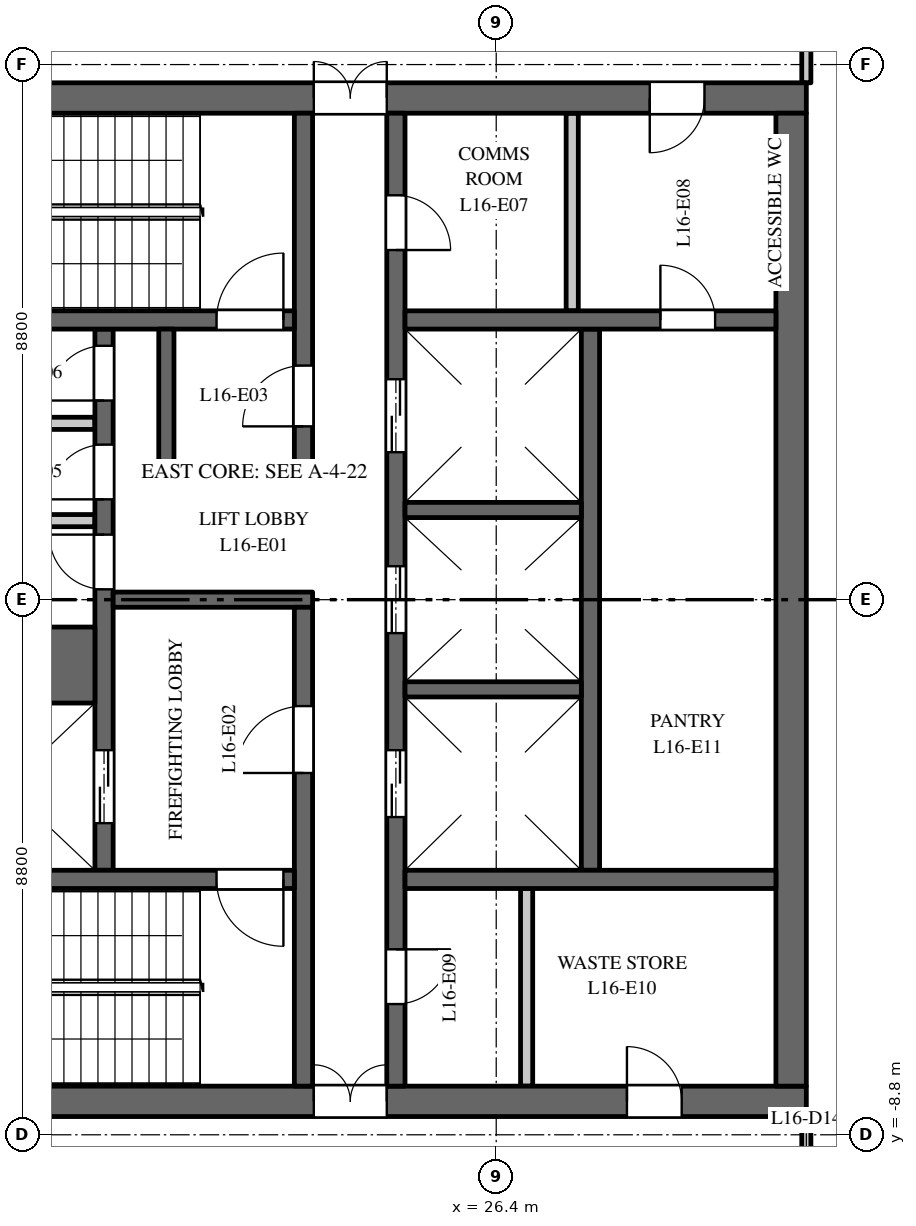
"""IFC4 building model, lengths in metres.
Left out: names, types, materials, properties, quantities, classifications, styles, units other than length and angle.
Written with IfcOpenShell. Run it as: python <this file> out.ifc"""

import sys

from ifc_helpers import new_model, si_unit, direction, frame, frame_2d, origin, place, context, subcontext, project, spatial, rectangle, extrude, element, fill, save


model = new_model("IFC4")
c1 = context("Model", 3, precision=1e-05, world=origin(), true_north=direction((0.0, 1.0)))
c2 = subcontext(c1, "Body", "Model", "MODEL_VIEW")
j1 = project(units=[si_unit("LENGTHUNIT", "METRE"), si_unit("PLANEANGLEUNIT", "RADIAN")], contexts=[c1])
p1 = place(None, origin())
s1 = spatial("IfcSite", under=j1, at=p1, CompositionType="ELEMENT")
p2 = place(p1, origin())
s2 = spatial("IfcBuilding", under=s1, at=p2, CompositionType="ELEMENT")
p3 = place(p2, frame((0.0, 0.0, 74.5)))
s3 = spatial("IfcBuildingStorey", under=s2, at=p3, CompositionType="ELEMENT", Elevation=74.5)
p4 = place(p3, frame((16.5, 8.25, 0.0), z_axis=(0.0, 0.0, 1.0), x_axis=(1.0, 0.0, 0.0)))
e1 = element("IfcWall", 1, at=p4, inside=s3, PredefinedType="SHEAR", context=c2, shape_type="SweptSolid", body=[
    extrude(rectangle(XDim=15.0, YDim=0.5, at=frame_2d((7.5, 0.0))), origin(), (0.0, 0.0, 1.0), 3.7),
])
p5 = place(p4, frame((6.9, 0.0, 0.0)))
e2 = element("IfcOpeningElement", 2, at=p5, cuts=e1, PredefinedType="OPENING", context=c2, shape_type="SweptSolid", body=[
    extrude(rectangle(XDim=1.2, YDim=2.1, at=frame_2d((0.6, 1.05))), frame((0.0, 0.26, 0.0), z_axis=(0.0, -1.0, 0.0), x_axis=(1.0, 0.0, 0.0)), (0.0, 0.0, 1.0), 0.52),
])
p6 = place(p4, frame((12.425, 0.0, 0.0)))
e3 = element("IfcOpeningElement", 3, at=p6, cuts=e1, PredefinedType="OPENING", context=c2, shape_type="SweptSolid", body=[
    extrude(rectangle(XDim=0.9, YDim=2.1, at=frame_2d((0.45, 1.05))), frame((0.0, 0.26, 0.0), z_axis=(0.0, -1.0, 0.0), x_axis=(1.0, 0.0, 0.0)), (0.0, 0.0, 1.0), 0.52),
])
p7 = place(p3, frame((16.5, -8.25, 0.0), z_axis=(0.0, 0.0, 1.0), x_axis=(1.0, 0.0, 0.0)))
e4 = element("IfcWall", 4, at=p7, inside=s3, PredefinedType="SHEAR", context=c2, shape_type="SweptSolid", body=[
    extrude(rectangle(XDim=15.0, YDim=0.5, at=frame_2d((7.5, 0.0))), origin(), (0.0, 0.0, 1.0), 3.7),
])
p8 = place(p7, frame((6.9, 0.0, 0.0)))
e5 = element("IfcOpeningElement", 5, at=p8, cuts=e4, PredefinedType="OPENING", context=c2, shape_type="SweptSolid", body=[
    extrude(rectangle(XDim=1.2, YDim=2.1, at=frame_2d((0.6, 1.05))), frame((0.0, 0.26, 0.0), z_axis=(0.0, -1.0, 0.0), x_axis=(1.0, 0.0, 0.0)), (0.0, 0.0, 1.0), 0.52),
])
p9 = place(p7, frame((12.05, 0.0, 0.0)))
e6 = element("IfcOpeningElement", 6, at=p9, cuts=e4, PredefinedType="OPENING", context=c2, shape_type="SweptSolid", body=[
    extrude(rectangle(XDim=0.9, YDim=2.1, at=frame_2d((0.45, 1.05))), frame((0.0, 0.26, 0.0), z_axis=(0.0, -1.0, 0.0), x_axis=(1.0, 0.0, 0.0)), (0.0, 0.0, 1.0), 0.52),
])
for number, where, z_axis, x_axis in (
    (7, (16.9, 1.3, 0.0), (0.0, 0.0, 1.0), (1.0, 0.0, 0.0)),
    (8, (16.9, 2.9, 0.0), (0.0, 0.0, 1.0), (1.0, 0.0, 0.0)),
):
    element("IfcWall", number, at=place(p3, frame(where, z_axis=z_axis, x_axis=x_axis)), inside=s3, PredefinedType="PARTITIONING", context=c2, shape_type="SweptSolid", body=[
        extrude(rectangle(XDim=2.9, YDim=0.2, at=frame_2d((1.45, 0.0))), origin(), (0.0, 0.0, 1.0), 3.7),
    ])
p10 = place(p3, frame((27.95, -4.45, 0.0), z_axis=(0.0, 0.0, 1.0), x_axis=(0.0, 1.0, 0.0)))
e9 = element("IfcWall", 9, at=p10, inside=s3, PredefinedType="SHEAR", context=c2, shape_type="SweptSolid", body=[
    extrude(rectangle(XDim=8.9, YDim=0.3, at=frame_2d((4.45, 0.0))), origin(), (0.0, 0.0, 1.0), 3.7),
])
p11 = place(p3, frame((19.95, -4.45, 0.0), z_axis=(0.0, 0.0, 1.0), x_axis=(0.0, 1.0, 0.0)))
e10 = element("IfcWall", 10, at=p11, inside=s3, PredefinedType="SHEAR", context=c2, shape_type="SweptSolid", body=[
    extrude(rectangle(XDim=8.9, YDim=0.3, at=frame_2d((4.45, 0.0))), origin(), (0.0, 0.0, 1.0), 3.7),
])
p12 = place(p11, frame((0.775, 0.0, 0.0)))
e11 = element("IfcOpeningElement", 11, at=p12, cuts=e10, PredefinedType="OPENING", context=c2, shape_type="SweptSolid", body=[
    extrude(rectangle(XDim=1.2, YDim=2.1, at=frame_2d((0.6, 1.05))), frame((0.0, 0.16, 0.0), z_axis=(0.0, -1.0, 0.0), x_axis=(1.0, 0.0, 0.0)), (0.0, 0.0, 1.0), 0.32),
])
p13 = place(p11, frame((4.62, 0.0, 0.0)))
e12 = element("IfcOpeningElement", 12, at=p13, cuts=e10, PredefinedType="OPENING", context=c2, shape_type="SweptSolid", body=[
    extrude(rectangle(XDim=0.9, YDim=2.1, at=frame_2d((0.45, 1.05))), frame((0.0, 0.16, 0.0), z_axis=(0.0, -1.0, 0.0), x_axis=(1.0, 0.0, 0.0)), (0.0, 0.0, 1.0), 0.32),
])
p14 = place(p11, frame((6.1, 0.0, 0.0)))
e13 = element("IfcOpeningElement", 13, at=p14, cuts=e10, PredefinedType="OPENING", context=c2, shape_type="SweptSolid", body=[
    extrude(rectangle(XDim=0.9, YDim=2.1, at=frame_2d((0.45, 1.05))), frame((0.0, 0.16, 0.0), z_axis=(0.0, -1.0, 0.0), x_axis=(1.0, 0.0, 0.0)), (0.0, 0.0, 1.0), 0.32),
])
p15 = place(p11, frame((7.725, 0.0, 0.0)))
e14 = element("IfcOpeningElement", 14, at=p15, cuts=e10, PredefinedType="OPENING", context=c2, shape_type="SweptSolid", body=[
    extrude(rectangle(XDim=0.9, YDim=2.1, at=frame_2d((0.45, 1.05))), frame((0.0, 0.16, 0.0), z_axis=(0.0, -1.0, 0.0), x_axis=(1.0, 0.0, 0.0)), (0.0, 0.0, 1.0), 0.32),
])
p16 = place(p3, frame((24.75, -8.0, 0.0), z_axis=(0.0, 0.0, 1.0), x_axis=(0.0, 1.0, 0.0)))
e15 = element("IfcWall", 15, at=p16, inside=s3, PredefinedType="SHEAR", context=c2, shape_type="SweptSolid", body=[
    extrude(rectangle(XDim=16.0, YDim=0.3, at=frame_2d((8.0, 0.0))), origin(), (0.0, 0.0, 1.0), 3.7),
])
p17 = place(p16, frame((4.425, 0.0, 0.0)))
e16 = element("IfcOpeningElement", 16, at=p17, cuts=e15, PredefinedType="OPENING", context=c2, shape_type="SweptSolid", body=[
    extrude(rectangle(XDim=1.1, YDim=2.1, at=frame_2d((0.55, 1.05))), frame((0.0, 0.16, 0.0), z_axis=(0.0, -1.0, 0.0), x_axis=(1.0, 0.0, 0.0)), (0.0, 0.0, 1.0), 0.32),
])
p18 = place(p16, frame((7.45, 0.0, 0.0)))
e17 = element("IfcOpeningElement", 17, at=p18, cuts=e15, PredefinedType="OPENING", context=c2, shape_type="SweptSolid", body=[
    extrude(rectangle(XDim=1.1, YDim=2.1, at=frame_2d((0.55, 1.05))), frame((0.0, 0.16, 0.0), z_axis=(0.0, -1.0, 0.0), x_axis=(1.0, 0.0, 0.0)), (0.0, 0.0, 1.0), 0.32),
])
p19 = place(p16, frame((10.425, 0.0, 0.0)))
e18 = element("IfcOpeningElement", 18, at=p19, cuts=e15, PredefinedType="OPENING", context=c2, shape_type="SweptSolid", body=[
    extrude(rectangle(XDim=1.2, YDim=2.1, at=frame_2d((0.6, 1.05))), frame((0.0, 0.16, 0.0), z_axis=(0.0, -1.0, 0.0), x_axis=(1.0, 0.0, 0.0)), (0.0, 0.0, 1.0), 0.32),
])
p20 = place(p16, frame((13.75, 0.0, 0.0)))
e19 = element("IfcOpeningElement", 19, at=p20, cuts=e15, PredefinedType="OPENING", context=c2, shape_type="SweptSolid", body=[
    extrude(rectangle(XDim=0.9, YDim=2.1, at=frame_2d((0.45, 1.05))), frame((0.0, 0.16, 0.0), z_axis=(0.0, -1.0, 0.0), x_axis=(1.0, 0.0, 0.0)), (0.0, 0.0, 1.0), 0.32),
])
p21 = place(p16, frame((1.35, 0.0, 0.0)))
e20 = element("IfcOpeningElement", 20, at=p21, cuts=e15, PredefinedType="OPENING", context=c2, shape_type="SweptSolid", body=[
    extrude(rectangle(XDim=0.9, YDim=2.1, at=frame_2d((0.45, 1.05))), frame((0.0, 0.16, 0.0), z_axis=(0.0, -1.0, 0.0), x_axis=(1.0, 0.0, 0.0)), (0.0, 0.0, 1.0), 0.32),
])
p22 = place(p3, frame((20.1, 0.0, 0.0), z_axis=(0.0, 0.0, 1.0), x_axis=(1.0, 0.0, 0.0)))
e21 = element("IfcWall", 21, at=p22, inside=s3, PredefinedType="SHEAR", context=c2, shape_type="SweptSolid", body=[
    extrude(rectangle(XDim=3.28, YDim=0.25, at=frame_2d((1.64, 0.0))), origin(), (0.0, 0.0, 1.0), 3.7),
])
p23 = place(p3, frame((31.25, -8.0, 0.0), z_axis=(0.0, 0.0, 1.0), x_axis=(0.0, 1.0, 0.0)))
e22 = element("IfcWall", 22, at=p23, inside=s3, PredefinedType="SHEAR", context=c2, shape_type="SweptSolid", body=[
    extrude(rectangle(XDim=16.0, YDim=0.5, at=frame_2d((8.0, 0.0))), origin(), (0.0, 0.0, 1.0), 3.7),
])
p24 = place(p3, frame((24.9, 4.6, 0.0), z_axis=(0.0, 0.0, 1.0), x_axis=(1.0, 0.0, 0.0)))
e23 = element("IfcWall", 23, at=p24, inside=s3, PredefinedType="SHEAR", context=c2, shape_type="SweptSolid", body=[
    extrude(rectangle(XDim=6.1, YDim=0.3, at=frame_2d((3.05, 0.0))), origin(), (0.0, 0.0, 1.0), 3.7),
])
p25 = place(p24, frame((4.2, 0.0, 0.0)))
e24 = element("IfcOpeningElement", 24, at=p25, cuts=e23, PredefinedType="OPENING", context=c2, shape_type="SweptSolid", body=[
    extrude(rectangle(XDim=0.9, YDim=2.1, at=frame_2d((0.45, 1.05))), frame((0.0, 0.16, 0.0), z_axis=(0.0, -1.0, 0.0), x_axis=(1.0, 0.0, 0.0)), (0.0, 0.0, 1.0), 0.32),
])
for number, where, z_axis, x_axis in (
    (25, (27.65, 4.75, 0.0), (0.0, 0.0, 1.0), (0.0, 1.0, 0.0)),
    (26, (26.9, -8.0, 0.0), (0.0, 0.0, 1.0), (0.0, 1.0, 0.0)),
):
    element("IfcWall", number, at=place(p3, frame(where, z_axis=z_axis, x_axis=x_axis)), inside=s3, PredefinedType="PARTITIONING", context=c2, shape_type="SweptSolid", body=[
        extrude(rectangle(XDim=3.25, YDim=0.2, at=frame_2d((1.625, 0.0))), origin(), (0.0, 0.0, 1.0), 3.7),
    ])
p26 = place(p3, frame((24.9, -4.6, 0.0), z_axis=(0.0, 0.0, 1.0), x_axis=(1.0, 0.0, 0.0)))
e27 = element("IfcWall", 27, at=p26, inside=s3, PredefinedType="SHEAR", context=c2, shape_type="SweptSolid", body=[
    extrude(rectangle(XDim=6.1, YDim=0.3, at=frame_2d((3.05, 0.0))), origin(), (0.0, 0.0, 1.0), 3.7),
])
p27 = place(p3, frame((16.9, -1.075, 0.0), z_axis=(0.0, 0.0, 1.0), x_axis=(1.0, 0.0, 0.0)))
e28 = element("IfcWall", 28, at=p27, inside=s3, PredefinedType="SHEAR", context=c2, shape_type="SweptSolid", body=[
    extrude(rectangle(XDim=2.9, YDim=1.25, at=frame_2d((1.45, 0.0))), origin(), (0.0, 0.0, 1.0), 3.7),
])
for number, where, z_axis, x_axis in (
    (29, (24.9, -1.475, 0.0), (0.0, 0.0, 1.0), (1.0, 0.0, 0.0)),
    (30, (24.9, 1.475, 0.0), (0.0, 0.0, 1.0), (1.0, 0.0, 0.0)),
):
    element("IfcWall", number, at=place(p3, frame(where, z_axis=z_axis, x_axis=x_axis)), inside=s3, PredefinedType="SHEAR", context=c2, shape_type="SweptSolid", body=[
        extrude(rectangle(XDim=2.9, YDim=0.25, at=frame_2d((1.45, 0.0))), origin(), (0.0, 0.0, 1.0), 3.7),
    ])
p28 = place(p3, frame((23.23, 2.25, 0.0), z_axis=(0.0, 0.0, 1.0), x_axis=(0.0, 1.0, 0.0)))
e31 = element("IfcWall", 31, at=p28, inside=s3, PredefinedType="SHEAR", context=c2, shape_type="SweptSolid", body=[
    extrude(rectangle(XDim=5.75, YDim=0.3, at=frame_2d((2.875, 0.0))), origin(), (0.0, 0.0, 1.0), 3.7),
])
p29 = place(p28, frame((0.6, 0.0, 0.0)))
e32 = element("IfcOpeningElement", 32, at=p29, cuts=e31, PredefinedType="OPENING", context=c2, shape_type="SweptSolid", body=[
    extrude(rectangle(XDim=1.0, YDim=2.1, at=frame_2d((0.5, 1.05))), frame((0.0, 0.16, 0.0), z_axis=(0.0, -1.0, 0.0), x_axis=(1.0, 0.0, 0.0)), (0.0, 0.0, 1.0), 0.32),
])
p30 = place(p3, frame((23.23, -8.0, 0.0), z_axis=(0.0, 0.0, 1.0), x_axis=(0.0, 1.0, 0.0)))
e33 = element("IfcWall", 33, at=p30, inside=s3, PredefinedType="SHEAR", context=c2, shape_type="SweptSolid", body=[
    extrude(rectangle(XDim=7.875, YDim=0.3, at=frame_2d((3.938, 0.0))), origin(), (0.0, 0.0, 1.0), 3.7),
])
p31 = place(p30, frame((5.15, 0.0, 0.0)))
e34 = element("IfcOpeningElement", 34, at=p31, cuts=e33, PredefinedType="OPENING", context=c2, shape_type="SweptSolid", body=[
    extrude(rectangle(XDim=1.1, YDim=2.1, at=frame_2d((0.55, 1.05))), frame((0.0, 0.16, 0.0), z_axis=(0.0, -1.0, 0.0), x_axis=(1.0, 0.0, 0.0)), (0.0, 0.0, 1.0), 0.32),
])
p32 = place(p3, frame((16.9, 4.6, 0.0), z_axis=(0.0, 0.0, 1.0), x_axis=(1.0, 0.0, 0.0)))
e35 = element("IfcWall", 35, at=p32, inside=s3, PredefinedType="SHEAR", context=c2, shape_type="SweptSolid", body=[
    extrude(rectangle(XDim=6.18, YDim=0.3, at=frame_2d((3.09, 0.0))), origin(), (0.0, 0.0, 1.0), 3.7),
])
p33 = place(p32, frame((4.9, 0.0, 0.0)))
e36 = element("IfcOpeningElement", 36, at=p33, cuts=e35, PredefinedType="OPENING", context=c2, shape_type="SweptSolid", body=[
    extrude(rectangle(XDim=1.1, YDim=2.1, at=frame_2d((0.55, 1.05))), frame((0.0, 0.16, 0.0), z_axis=(0.0, -1.0, 0.0), x_axis=(1.0, 0.0, 0.0)), (0.0, 0.0, 1.0), 0.32),
])
p34 = place(p3, frame((16.9, -4.6, 0.0), z_axis=(0.0, 0.0, 1.0), x_axis=(1.0, 0.0, 0.0)))
e37 = element("IfcWall", 37, at=p34, inside=s3, PredefinedType="SHEAR", context=c2, shape_type="SweptSolid", body=[
    extrude(rectangle(XDim=6.18, YDim=0.3, at=frame_2d((3.09, 0.0))), origin(), (0.0, 0.0, 1.0), 3.7),
])
p35 = place(p34, frame((4.9, 0.0, 0.0)))
e38 = element("IfcOpeningElement", 38, at=p35, cuts=e37, PredefinedType="OPENING", context=c2, shape_type="SweptSolid", body=[
    extrude(rectangle(XDim=1.1, YDim=2.1, at=frame_2d((0.55, 1.05))), frame((0.0, 0.16, 0.0), z_axis=(0.0, -1.0, 0.0), x_axis=(1.0, 0.0, 0.0)), (0.0, 0.0, 1.0), 0.32),
])
p36 = place(p3, frame((20.85, 2.125, 0.0), z_axis=(0.0, 0.0, 1.0), x_axis=(1.0, 0.0, 0.0)))
e39 = element("IfcWall", 39, at=p36, inside=s3, PredefinedType="SHEAR", context=c2, shape_type="SweptSolid", body=[
    extrude(rectangle(XDim=2.53, YDim=0.25, at=frame_2d((1.265, 0.0))), origin(), (0.0, 0.0, 1.0), 3.7),
])
p37 = place(p3, frame((20.975, 2.25, 0.0), z_axis=(0.0, 0.0, 1.0), x_axis=(0.0, 1.0, 0.0)))
e40 = element("IfcWall", 40, at=p37, inside=s3, PredefinedType="SHEAR", context=c2, shape_type="SweptSolid", body=[
    extrude(rectangle(XDim=2.2, YDim=0.25, at=frame_2d((1.1, 0.0))), origin(), (0.0, 0.0, 1.0), 3.7),
])
p38 = place(p3, frame((31.5, -10.7, 0.0), z_axis=(0.0, 0.0, 1.0), x_axis=(0.0, 1.0, 0.0)))
e41 = element("IfcWall", 41, at=p38, inside=s3, PredefinedType="PARTITIONING", context=c2, shape_type="SweptSolid", body=[
    extrude(rectangle(XDim=2.2, YDim=0.15, at=frame_2d((1.1, 0.0))), origin(), (0.0, 0.0, 1.0), 2.85),
])
p39 = place(p38, frame((0.65, 0.0, 0.0)))
e42 = element("IfcOpeningElement", 42, at=p39, cuts=e41, PredefinedType="OPENING", context=c2, shape_type="SweptSolid", body=[
    extrude(rectangle(XDim=1.0, YDim=2.1, at=frame_2d((0.5, 1.05))), frame((0.0, 0.085, 0.0), z_axis=(0.0, -1.0, 0.0), x_axis=(1.0, 0.0, 0.0)), (0.0, 0.0, 1.0), 0.17),
])
p40 = place(p3, frame((31.5, 8.5, 0.0), z_axis=(0.0, 0.0, 1.0), x_axis=(0.0, 1.0, 0.0)))
e43 = element("IfcWall", 43, at=p40, inside=s3, PredefinedType="PARTITIONING", context=c2, shape_type="SweptSolid", body=[
    extrude(rectangle(XDim=2.2, YDim=0.15, at=frame_2d((1.1, 0.0))), origin(), (0.0, 0.0, 1.0), 2.85),
])
p41 = place(p12, origin())
e44 = element("IfcDoor", 44, at=p41, inside=s3, OperationType="DOUBLE_DOOR_SLIDING", PredefinedType="DOOR", context=c2, shape_type="SweptSolid", body=[
    extrude(rectangle(XDim=1.2, YDim=2.1, at=frame_2d((0.6, 1.05))), frame((0.0, 0.025, 0.0), z_axis=(0.0, -1.0, 0.0), x_axis=(1.0, 0.0, 0.0)), (0.0, 0.0, 1.0), 0.05),
])
fill(e11, e44)
p42 = place(p17, origin())
e45 = element("IfcDoor", 45, at=p42, inside=s3, OperationType="DOUBLE_DOOR_SLIDING", PredefinedType="DOOR", context=c2, shape_type="SweptSolid", body=[
    extrude(rectangle(XDim=1.1, YDim=2.1, at=frame_2d((0.55, 1.05))), frame((0.0, 0.025, 0.0), z_axis=(0.0, -1.0, 0.0), x_axis=(1.0, 0.0, 0.0)), (0.0, 0.0, 1.0), 0.05),
])
fill(e16, e45)
p43 = place(p18, origin())
e46 = element("IfcDoor", 46, at=p43, inside=s3, OperationType="DOUBLE_DOOR_SLIDING", PredefinedType="DOOR", context=c2, shape_type="SweptSolid", body=[
    extrude(rectangle(XDim=1.1, YDim=2.1, at=frame_2d((0.55, 1.05))), frame((0.0, 0.025, 0.0), z_axis=(0.0, -1.0, 0.0), x_axis=(1.0, 0.0, 0.0)), (0.0, 0.0, 1.0), 0.05),
])
fill(e17, e46)
p44 = place(p19, origin())
e47 = element("IfcDoor", 47, at=p44, inside=s3, OperationType="DOUBLE_DOOR_SLIDING", PredefinedType="DOOR", context=c2, shape_type="SweptSolid", body=[
    extrude(rectangle(XDim=1.2, YDim=2.1, at=frame_2d((0.6, 1.05))), frame((0.0, 0.025, 0.0), z_axis=(0.0, -1.0, 0.0), x_axis=(1.0, 0.0, 0.0)), (0.0, 0.0, 1.0), 0.05),
])
fill(e18, e47)
p45 = place(p33, origin())
e48 = element("IfcDoor", 48, at=p45, inside=s3, OperationType="SINGLE_SWING_LEFT", PredefinedType="DOOR", context=c2, shape_type="SweptSolid", body=[
    extrude(rectangle(XDim=1.1, YDim=2.1, at=frame_2d((0.55, 1.05))), frame((0.0, 0.025, 0.0), z_axis=(0.0, -1.0, 0.0), x_axis=(1.0, 0.0, 0.0)), (0.0, 0.0, 1.0), 0.05),
])
fill(e36, e48)
p46 = place(p35, origin())
e49 = element("IfcDoor", 49, at=p46, inside=s3, OperationType="SINGLE_SWING_RIGHT", PredefinedType="DOOR", context=c2, shape_type="SweptSolid", body=[
    extrude(rectangle(XDim=1.1, YDim=2.1, at=frame_2d((0.55, 1.05))), frame((0.0, 0.025, 0.0), z_axis=(0.0, -1.0, 0.0), x_axis=(1.0, 0.0, 0.0)), (0.0, 0.0, 1.0), 0.05),
])
fill(e38, e49)
p47 = place(p31, origin())
e50 = element("IfcDoor", 50, at=p47, inside=s3, OperationType="SINGLE_SWING_RIGHT", PredefinedType="DOOR", context=c2, shape_type="SweptSolid", body=[
    extrude(rectangle(XDim=1.1, YDim=2.1, at=frame_2d((0.55, 1.05))), frame((0.0, 0.025, 0.0), z_axis=(0.0, -1.0, 0.0), x_axis=(1.0, 0.0, 0.0)), (0.0, 0.0, 1.0), 0.05),
])
fill(e34, e50)
p48 = place(p29, origin())
e51 = element("IfcDoor", 51, at=p48, inside=s3, OperationType="SINGLE_SWING_RIGHT", PredefinedType="DOOR", context=c2, shape_type="SweptSolid", body=[
    extrude(rectangle(XDim=1.0, YDim=2.1, at=frame_2d((0.5, 1.05))), frame((0.0, 0.025, 0.0), z_axis=(0.0, -1.0, 0.0), x_axis=(1.0, 0.0, 0.0)), (0.0, 0.0, 1.0), 0.05),
])
fill(e32, e51)
p49 = place(p5, origin())
e52 = element("IfcDoor", 52, at=p49, inside=s3, OperationType="DOUBLE_DOOR_DOUBLE_SWING", PredefinedType="DOOR", context=c2, shape_type="SweptSolid", body=[
    extrude(rectangle(XDim=1.2, YDim=2.1, at=frame_2d((0.6, 1.05))), frame((0.0, 0.025, 0.0), z_axis=(0.0, -1.0, 0.0), x_axis=(1.0, 0.0, 0.0)), (0.0, 0.0, 1.0), 0.05),
])
fill(e2, e52)
p50 = place(p8, origin())
e53 = element("IfcDoor", 53, at=p50, inside=s3, OperationType="DOUBLE_DOOR_DOUBLE_SWING", PredefinedType="DOOR", context=c2, shape_type="SweptSolid", body=[
    extrude(rectangle(XDim=1.2, YDim=2.1, at=frame_2d((0.6, 1.05))), frame((0.0, 0.025, 0.0), z_axis=(0.0, -1.0, 0.0), x_axis=(1.0, 0.0, 0.0)), (0.0, 0.0, 1.0), 0.05),
])
fill(e5, e53)
p51 = place(p13, origin())
e54 = element("IfcDoor", 54, at=p51, inside=s3, OperationType="SINGLE_SWING_LEFT", PredefinedType="DOOR", context=c2, shape_type="SweptSolid", body=[
    extrude(rectangle(XDim=0.9, YDim=2.1, at=frame_2d((0.45, 1.05))), frame((0.0, 0.025, 0.0), z_axis=(0.0, -1.0, 0.0), x_axis=(1.0, 0.0, 0.0)), (0.0, 0.0, 1.0), 0.05),
])
fill(e12, e54)
p52 = place(p14, origin())
e55 = element("IfcDoor", 55, at=p52, inside=s3, OperationType="SINGLE_SWING_RIGHT", PredefinedType="DOOR", context=c2, shape_type="SweptSolid", body=[
    extrude(rectangle(XDim=0.9, YDim=2.1, at=frame_2d((0.45, 1.05))), frame((0.0, 0.025, 0.0), z_axis=(0.0, -1.0, 0.0), x_axis=(1.0, 0.0, 0.0)), (0.0, 0.0, 1.0), 0.05),
])
fill(e13, e55)
p53 = place(p15, origin())
e56 = element("IfcDoor", 56, at=p53, inside=s3, OperationType="SINGLE_SWING_RIGHT", PredefinedType="DOOR", context=c2, shape_type="SweptSolid", body=[
    extrude(rectangle(XDim=0.9, YDim=2.1, at=frame_2d((0.45, 1.05))), frame((0.0, 0.025, 0.0), z_axis=(0.0, -1.0, 0.0), x_axis=(1.0, 0.0, 0.0)), (0.0, 0.0, 1.0), 0.05),
])
fill(e14, e56)
p54 = place(p20, origin())
e57 = element("IfcDoor", 57, at=p54, inside=s3, OperationType="SINGLE_SWING_LEFT", PredefinedType="DOOR", context=c2, shape_type="SweptSolid", body=[
    extrude(rectangle(XDim=0.9, YDim=2.1, at=frame_2d((0.45, 1.05))), frame((0.0, 0.025, 0.0), z_axis=(0.0, -1.0, 0.0), x_axis=(1.0, 0.0, 0.0)), (0.0, 0.0, 1.0), 0.05),
])
fill(e19, e57)
p55 = place(p6, origin())
e58 = element("IfcDoor", 58, at=p55, inside=s3, OperationType="SINGLE_SWING_LEFT", PredefinedType="DOOR", context=c2, shape_type="SweptSolid", body=[
    extrude(rectangle(XDim=0.9, YDim=2.1, at=frame_2d((0.45, 1.05))), frame((0.0, 0.025, 0.0), z_axis=(0.0, -1.0, 0.0), x_axis=(1.0, 0.0, 0.0)), (0.0, 0.0, 1.0), 0.05),
])
fill(e3, e58)
p56 = place(p21, origin())
e59 = element("IfcDoor", 59, at=p56, inside=s3, OperationType="SINGLE_SWING_RIGHT", PredefinedType="DOOR", context=c2, shape_type="SweptSolid", body=[
    extrude(rectangle(XDim=0.9, YDim=2.1, at=frame_2d((0.45, 1.05))), frame((0.0, 0.025, 0.0), z_axis=(0.0, -1.0, 0.0), x_axis=(1.0, 0.0, 0.0)), (0.0, 0.0, 1.0), 0.05),
])
fill(e20, e59)
p57 = place(p9, origin())
e60 = element("IfcDoor", 60, at=p57, inside=s3, OperationType="SINGLE_SWING_RIGHT", PredefinedType="DOOR", context=c2, shape_type="SweptSolid", body=[
    extrude(rectangle(XDim=0.9, YDim=2.1, at=frame_2d((0.45, 1.05))), frame((0.0, 0.025, 0.0), z_axis=(0.0, -1.0, 0.0), x_axis=(1.0, 0.0, 0.0)), (0.0, 0.0, 1.0), 0.05),
])
fill(e6, e60)
p58 = place(p25, origin())
e61 = element("IfcDoor", 61, at=p58, inside=s3, OperationType="SINGLE_SWING_RIGHT", PredefinedType="DOOR", context=c2, shape_type="SweptSolid", body=[
    extrude(rectangle(XDim=0.9, YDim=2.1, at=frame_2d((0.45, 1.05))), frame((0.0, 0.025, 0.0), z_axis=(0.0, -1.0, 0.0), x_axis=(1.0, 0.0, 0.0)), (0.0, 0.0, 1.0), 0.05),
])
fill(e24, e61)
save(model, sys.argv[1])
